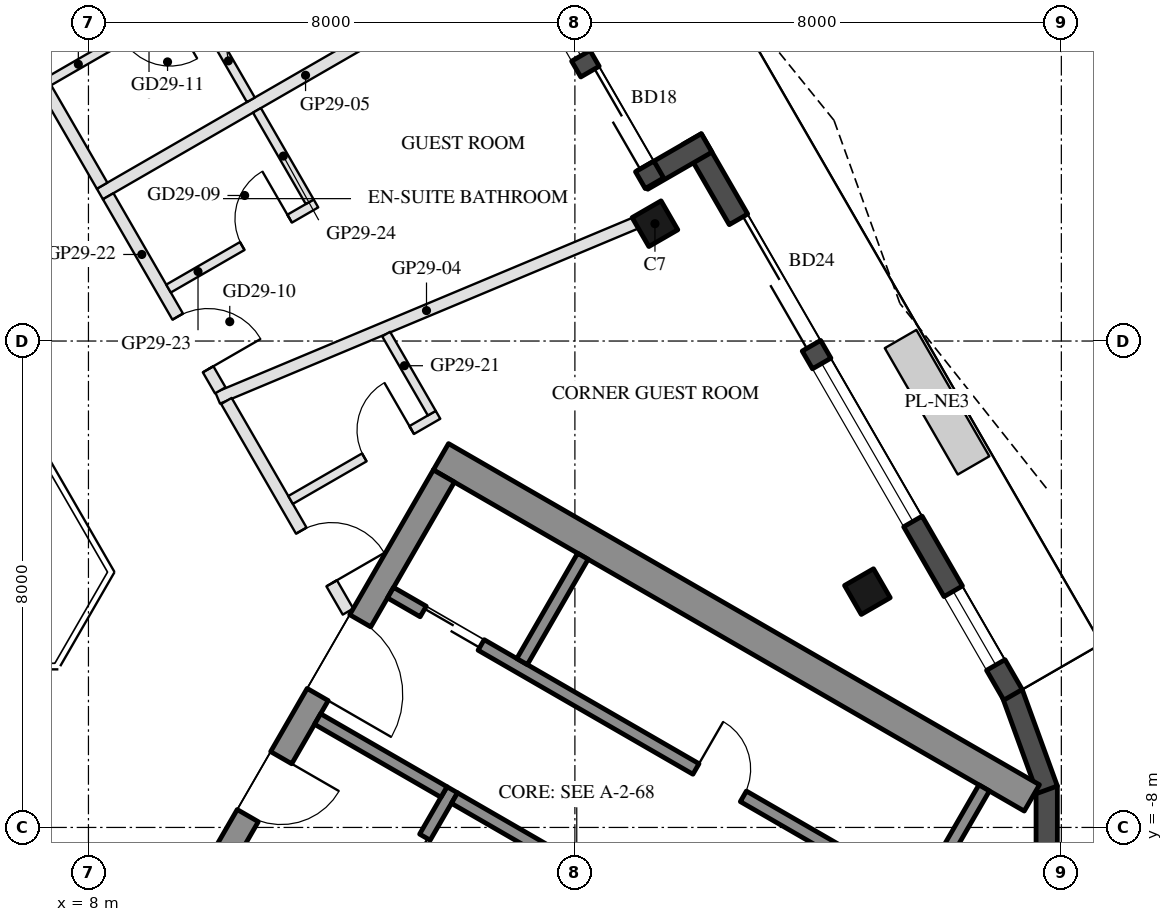
"""IFC4 building model, lengths in metres.
Left out: names, types, materials, properties, quantities, classifications, styles, units other than length and angle.
Written with IfcOpenShell. Run it as: python <this file> out.ifc"""

import sys

from ifc_helpers import new_model, si_unit, direction, frame, frame_2d, origin, origin_2d, place, context, subcontext, project, spatial, rectangle, hollow_rectangle, extrude, boolean, halfspace, element, fill, save


model = new_model("IFC4")
c1 = context("Model", 3, precision=1e-05, world=origin(), true_north=direction((0.0, 1.0)))
c2 = subcontext(c1, "Body", "Model", "MODEL_VIEW")
j1 = project(units=[si_unit("LENGTHUNIT", "METRE"), si_unit("PLANEANGLEUNIT", "RADIAN")], contexts=[c1])
p1 = place(None, origin())
s1 = spatial("IfcSite", under=j1, at=p1, CompositionType="ELEMENT")
p2 = place(p1, origin())
s2 = spatial("IfcBuilding", under=s1, at=p2, CompositionType="ELEMENT")
p3 = place(p2, frame((0.0, 0.0, 294.8)))
s3 = spatial("IfcBuildingStorey", under=s2, at=p3, CompositionType="ELEMENT", Elevation=294.8)
p4 = place(p3, frame((20.81, -4.121, 0.0), z_axis=(0.0, 0.0, 1.0), x_axis=(-0.5, 0.866025403784, 0.0)))
e1 = element("IfcColumn", 1, at=p4, inside=s3, PredefinedType="COLUMN", context=c2, shape_type="SweptSolid", body=[
    boolean("DIFFERENCE", extrude(hollow_rectangle(XDim=0.55, YDim=0.55, WallThickness=0.025, at=origin_2d()), origin(), (0.0, 0.0, 1.0), 3.7), halfspace(frame((0.0, 0.0, 3.66), z_axis=(0.0, 0.0, 1.0), x_axis=(1.0, 0.0, 0.0)), False)),
])
p5 = place(p3, frame((17.317, 1.93, 0.0), z_axis=(0.0, 0.0, 1.0), x_axis=(-0.5, 0.866025403784, 0.0)))
e2 = element("IfcColumn", 2, at=p5, inside=s3, PredefinedType="COLUMN", context=c2, shape_type="SweptSolid", body=[
    boolean("DIFFERENCE", extrude(hollow_rectangle(XDim=0.55, YDim=0.55, WallThickness=0.025, at=origin_2d()), origin(), (0.0, 0.0, 1.0), 3.7), halfspace(frame((0.0, 0.0, 3.666), z_axis=(0.0, 0.0, 1.0), x_axis=(1.0, 0.0, 0.0)), False)),
])
for number, where, z_axis, x_axis in (
    (3, (23.759, -9.008, 0.0), (0.0, 0.0, 1.0), (0.0, 1.0, 0.0)),
    (4, (23.77, -7.379, 0.0), (0.0, 0.0, 1.0), (-0.342, 0.94, 0.0)),
):
    element("IfcWall", number, at=place(p3, frame(where, z_axis=z_axis, x_axis=x_axis)), inside=s3, PredefinedType="SOLIDWALL", context=c2, shape_type="SweptSolid", body=[
        extrude(rectangle(XDim=1.689, YDim=0.35, at=frame_2d((0.845, 0.0))), origin(), (0.0, 0.0, 1.0), 3.55),
    ])
p6 = place(p3, frame((23.205, -5.819, 0.0), z_axis=(0.0, 0.0, 1.0), x_axis=(-0.500010118922, 0.866019561543, 0.0)))
e5 = element("IfcWall", 5, at=p6, inside=s3, PredefinedType="SOLIDWALL", context=c2, shape_type="SweptSolid", body=[
    extrude(rectangle(XDim=10.554, YDim=0.35, at=frame_2d((5.277, 0.0))), origin(), (0.0, 0.0, 1.0), 3.55),
])
p7 = place(p6, frame((0.566, 0.0, 0.3)))
e6 = element("IfcOpeningElement", 6, at=p7, cuts=e5, PredefinedType="OPENING", context=c2, shape_type="SweptSolid", body=[
    extrude(rectangle(XDim=1.4, YDim=2.65, at=frame_2d((0.7, 1.325))), frame((0.0, 0.185, 0.0), z_axis=(0.0, -1.0, 0.0), x_axis=(1.0, 0.0, 0.0)), (0.0, 0.0, 1.0), 0.37),
])
p8 = place(p6, frame((6.63, 0.0, 0.0)))
e7 = element("IfcOpeningElement", 7, at=p8, cuts=e5, PredefinedType="OPENING", context=c2, shape_type="SweptSolid", body=[
    extrude(rectangle(XDim=2.4, YDim=2.4, at=frame_2d((1.2, 1.2))), frame((0.0, 0.185, 0.0), z_axis=(0.0, -1.0, 0.0), x_axis=(1.0, 0.0, 0.0)), (0.0, 0.0, 1.0), 0.37),
])
p9 = place(p6, frame((3.292, 0.0, 0.3)))
e8 = element("IfcOpeningElement", 8, at=p9, cuts=e5, PredefinedType="OPENING", context=c2, shape_type="SweptSolid", body=[
    extrude(rectangle(XDim=3.0, YDim=2.65, at=frame_2d((1.5, 1.325))), frame((0.0, 0.185, 0.0), z_axis=(0.0, -1.0, 0.0), x_axis=(1.0, 0.0, 0.0)), (0.0, 0.0, 1.0), 0.37),
])
p10 = place(p3, frame((18.167, 3.258, 0.0), z_axis=(0.0, 0.0, 1.0), x_axis=(-0.866005645448, -0.500034220881, 0.0)))
e9 = element("IfcWall", 9, at=p10, inside=s3, PredefinedType="SOLIDWALL", context=c2, shape_type="SweptSolid", body=[
    extrude(rectangle(XDim=1.22, YDim=0.35, at=frame_2d((0.61, 0.0))), origin(), (0.0, 0.0, 1.0), 3.55),
])
p11 = place(p3, frame((17.308, 2.595, 0.0), z_axis=(0.0, 0.0, 1.0), x_axis=(-0.500005339912, 0.866022320763, 0.0)))
e10 = element("IfcWall", 10, at=p11, inside=s3, PredefinedType="SOLIDWALL", context=c2, shape_type="SweptSolid", body=[
    extrude(rectangle(XDim=5.827, YDim=0.35, at=frame_2d((2.914, 0.0))), origin(), (0.0, 0.0, 1.0), 3.55),
])
p12 = place(p11, frame((0.32, 0.0, 0.0)))
e11 = element("IfcOpeningElement", 11, at=p12, cuts=e10, PredefinedType="OPENING", context=c2, shape_type="SweptSolid", body=[
    extrude(rectangle(XDim=1.8, YDim=2.4, at=frame_2d((0.9, 1.2))), frame((0.0, 0.185, 0.0), z_axis=(0.0, -1.0, 0.0), x_axis=(1.0, 0.0, 0.0)), (0.0, 0.0, 1.0), 0.37),
])
p13 = place(p11, frame((2.42, 0.0, 0.3)))
e12 = element("IfcOpeningElement", 12, at=p13, cuts=e10, PredefinedType="OPENING", context=c2, shape_type="SweptSolid", body=[
    extrude(rectangle(XDim=1.5, YDim=2.65, at=frame_2d((0.75, 1.325))), frame((0.0, 0.185, 0.0), z_axis=(0.0, -1.0, 0.0), x_axis=(1.0, 0.0, 0.0)), (0.0, 0.0, 1.0), 0.37),
])
p14 = place(p3, frame((13.797, -1.903, 0.0), z_axis=(0.0, 0.0, 1.0), x_axis=(0.866025449148, -0.499999921427, 0.0)))
e13 = element("IfcWall", 13, at=p14, inside=s3, PredefinedType="SHEAR", context=c2, shape_type="SweptSolid", body=[
    extrude(rectangle(XDim=11.222, YDim=0.5, at=frame_2d((5.611, 0.0))), origin(), (0.0, 0.0, 1.0), 3.5),
])
p15 = place(p3, frame((8.845, -10.88, 0.0), z_axis=(0.0, 0.0, 1.0), x_axis=(0.500004234368, 0.866022959057, 0.0)))
e14 = element("IfcWall", 14, at=p15, inside=s3, PredefinedType="SHEAR", context=c2, shape_type="SweptSolid", body=[
    extrude(rectangle(XDim=10.0, YDim=0.4, at=frame_2d((5.0, 0.0))), origin(), (0.0, 0.0, 1.0), 3.5),
])
p16 = place(p15, frame((3.55, 0.0, 0.0)))
e15 = element("IfcOpeningElement", 15, at=p16, cuts=e14, PredefinedType="OPENING", context=c2, shape_type="SweptSolid", body=[
    extrude(rectangle(XDim=1.1, YDim=2.1, at=frame_2d((0.55, 1.05))), frame((0.0, 0.21, 0.0), z_axis=(0.0, -1.0, 0.0), x_axis=(1.0, 0.0, 0.0)), (0.0, 0.0, 1.0), 0.42),
])
p17 = place(p15, frame((5.85, 0.0, 0.0)))
e16 = element("IfcOpeningElement", 16, at=p17, cuts=e14, PredefinedType="OPENING", context=c2, shape_type="SweptSolid", body=[
    extrude(rectangle(XDim=1.4, YDim=2.1, at=frame_2d((0.7, 1.05))), frame((0.0, 0.21, 0.0), z_axis=(0.0, -1.0, 0.0), x_axis=(1.0, 0.0, 0.0)), (0.0, 0.0, 1.0), 0.42),
])
p18 = place(p3, frame((12.583, -9.805, 0.0), z_axis=(0.0, 0.0, 1.0), x_axis=(0.49994636267, 0.866056369097, 0.0)))
e17 = element("IfcWall", 17, at=p18, inside=s3, PredefinedType="SHEAR", context=c2, shape_type="SweptSolid", body=[
    extrude(rectangle(XDim=2.8, YDim=0.2, at=frame_2d((1.4, 0.0))), origin(), (0.0, 0.0, 1.0), 3.5),
])
p19 = place(p18, frame((0.7, 0.0, 0.0)))
e18 = element("IfcOpeningElement", 18, at=p19, cuts=e17, PredefinedType="OPENING", context=c2, shape_type="SweptSolid", body=[
    extrude(rectangle(XDim=1.2, YDim=2.1, at=frame_2d((0.6, 1.05))), frame((0.0, 0.11, 0.0), z_axis=(0.0, -1.0, 0.0), x_axis=(1.0, 0.0, 0.0)), (0.0, 0.0, 1.0), 0.22),
])
p20 = place(p3, frame((11.768, -6.217, 0.0), z_axis=(0.0, 0.0, 1.0), x_axis=(0.866050077142, -0.499957262057, 0.0)))
e19 = element("IfcWall", 19, at=p20, inside=s3, PredefinedType="SHEAR", context=c2, shape_type="SweptSolid", body=[
    extrude(rectangle(XDim=2.4, YDim=0.2, at=frame_2d((1.2, 0.0))), origin(), (0.0, 0.0, 1.0), 3.5),
])
p21 = place(p3, frame((14.02, -7.517, 0.0), z_axis=(0.0, 0.0, 1.0), x_axis=(0.866034573852, -0.49998411664, 0.0)))
e20 = element("IfcWall", 20, at=p21, inside=s3, PredefinedType="SHEAR", context=c2, shape_type="SweptSolid", body=[
    extrude(rectangle(XDim=2.8, YDim=0.2, at=frame_2d((1.4, 0.0))), origin(), (0.0, 0.0, 1.0), 3.5),
])
p22 = place(p3, frame((12.968, -4.138, 0.0), z_axis=(0.0, 0.0, 1.0), x_axis=(0.866028328073, -0.49999493495, 0.0)))
e21 = element("IfcWall", 21, at=p22, inside=s3, PredefinedType="SHEAR", context=c2, shape_type="SweptSolid", body=[
    extrude(rectangle(XDim=10.16, YDim=0.2, at=frame_2d((5.08, 0.0))), origin(), (0.0, 0.0, 1.0), 3.5),
])
p23 = place(p22, frame((0.62, 0.0, 0.0)))
e22 = element("IfcOpeningElement", 22, at=p23, cuts=e21, PredefinedType="OPENING", context=c2, shape_type="SweptSolid", body=[
    extrude(rectangle(XDim=1.1, YDim=2.1, at=frame_2d((0.55, 1.05))), frame((0.0, 0.11, 0.0), z_axis=(0.0, -1.0, 0.0), x_axis=(1.0, 0.0, 0.0)), (0.0, 0.0, 1.0), 0.22),
])
p24 = place(p22, frame((5.8, 0.0, 0.0)))
e23 = element("IfcOpeningElement", 23, at=p24, cuts=e21, PredefinedType="OPENING", context=c2, shape_type="SweptSolid", body=[
    extrude(rectangle(XDim=0.9, YDim=2.1, at=frame_2d((0.45, 1.05))), frame((0.0, 0.11, 0.0), z_axis=(0.0, -1.0, 0.0), x_axis=(1.0, 0.0, 0.0)), (0.0, 0.0, 1.0), 0.22),
])
for number, where, z_axis, x_axis in (
    (24, (15.131, -5.272, 0.0), (0.0, 0.0, 1.0), (0.5, 0.866, 0.0)),
    (25, (21.73, -9.082, 0.0), (0.0, 0.0, 1.0), (0.5, 0.866, 0.0)),
):
    element("IfcWall", number, at=place(p3, frame(where, z_axis=z_axis, x_axis=x_axis)), inside=s3, PredefinedType="SHEAR", context=c2, shape_type="SweptSolid", body=[
        extrude(rectangle(XDim=2.0, YDim=0.2, at=frame_2d((1.0, 0.0))), origin(), (0.0, 0.0, 1.0), 3.5),
    ])
p25 = place(p3, frame((16.994, 1.939, 0.0), z_axis=(0.0, 0.0, 1.0), x_axis=(-0.922394541425, -0.386249025824, 0.0)))
e26 = element("IfcWall", 26, at=p25, inside=s3, PredefinedType="PARTITIONING", context=c2, shape_type="SweptSolid", body=[
    extrude(rectangle(XDim=7.447, YDim=0.2, at=frame_2d((3.723, 0.0))), origin(), (0.0, 0.0, 1.0), 3.05),
])
p26 = place(p3, frame((14.953, 6.324, 0.0), z_axis=(0.0, 0.0, 1.0), x_axis=(-0.866030491634, -0.499991187483, 0.0)))
e27 = element("IfcWall", 27, at=p26, inside=s3, PredefinedType="PARTITIONING", context=c2, shape_type="SweptSolid", body=[
    extrude(rectangle(XDim=7.812, YDim=0.2, at=frame_2d((3.906, 0.0))), origin(), (0.0, 0.0, 1.0), 3.1),
])
p27 = place(p3, frame((10.269, -0.986, 0.0), z_axis=(0.0, 0.0, 1.0), x_axis=(0.50004472278, -0.865999581536, 0.0)))
e28 = element("IfcWall", 28, at=p27, inside=s3, PredefinedType="PARTITIONING", context=c2, shape_type="SweptSolid", body=[
    extrude(rectangle(XDim=4.0, YDim=0.2, at=frame_2d((2.0, 0.0))), origin(), (0.0, 0.0, 1.0), 3.05),
])
p28 = place(p27, frame((2.463, 0.0, 0.0)))
e29 = element("IfcOpeningElement", 29, at=p28, cuts=e28, PredefinedType="OPENING", context=c2, shape_type="SweptSolid", body=[
    extrude(rectangle(XDim=1.0, YDim=2.1, at=frame_2d((0.5, 1.05))), frame((0.0, 0.11, 0.0), z_axis=(0.0, -1.0, 0.0), x_axis=(1.0, 0.0, 0.0)), (0.0, 0.0, 1.0), 0.22),
])
p29 = place(p3, frame((11.324, -2.614, 0.0), z_axis=(0.0, 0.0, 1.0), x_axis=(0.866034573852, 0.49998411664, 0.0)))
e30 = element("IfcWall", 30, at=p29, inside=s3, PredefinedType="PARTITIONING", context=c2, shape_type="SweptSolid", body=[
    extrude(rectangle(XDim=2.8, YDim=0.15, at=frame_2d((1.4, 0.0))), origin(), (0.0, 0.0, 1.0), 3.55),
])
p30 = place(p29, frame((1.4, 0.0, 0.0)))
e31 = element("IfcOpeningElement", 31, at=p30, cuts=e30, PredefinedType="OPENING", context=c2, shape_type="SweptSolid", body=[
    extrude(rectangle(XDim=0.9, YDim=2.1, at=frame_2d((0.45, 1.05))), frame((0.0, 0.085, 0.0), z_axis=(0.0, -1.0, 0.0), x_axis=(1.0, 0.0, 0.0)), (0.0, 0.0, 1.0), 0.17),
])
p31 = place(p3, frame((13.646, -1.187, 0.0), z_axis=(0.0, 0.0, 1.0), x_axis=(-0.499985098601, 0.86603400694, 0.0)))
e32 = element("IfcWall", 32, at=p31, inside=s3, PredefinedType="PARTITIONING", context=c2, shape_type="SweptSolid", body=[
    extrude(rectangle(XDim=1.502, YDim=0.15, at=frame_2d((0.751, 0.0))), origin(), (0.0, 0.0, 1.0), 3.05),
])
p32 = place(p3, frame((8.325, 2.381, 0.0), z_axis=(0.0, 0.0, 1.0), x_axis=(0.499949858301, -0.866054351173, 0.0)))
e33 = element("IfcWall", 33, at=p32, inside=s3, PredefinedType="PARTITIONING", context=c2, shape_type="SweptSolid", body=[
    extrude(rectangle(XDim=3.687, YDim=0.2, at=frame_2d((1.843, 0.0))), origin(), (0.0, 0.0, 1.0), 3.05),
])
p33 = place(p32, frame((2.286, 0.0, 0.0)))
e34 = element("IfcOpeningElement", 34, at=p33, cuts=e33, PredefinedType="OPENING", context=c2, shape_type="SweptSolid", body=[
    extrude(rectangle(XDim=1.0, YDim=2.1, at=frame_2d((0.5, 1.05))), frame((0.0, 0.11, 0.0), z_axis=(0.0, -1.0, 0.0), x_axis=(1.0, 0.0, 0.0)), (0.0, 0.0, 1.0), 0.22),
])
p34 = place(p3, frame((9.317, 0.863, 0.0), z_axis=(0.0, 0.0, 1.0), x_axis=(0.865996816683, 0.500049511043, 0.0)))
e35 = element("IfcWall", 35, at=p34, inside=s3, PredefinedType="PARTITIONING", context=c2, shape_type="SweptSolid", body=[
    extrude(rectangle(XDim=2.8, YDim=0.15, at=frame_2d((1.4, 0.0))), origin(), (0.0, 0.0, 1.0), 3.55),
])
p35 = place(p34, frame((1.4, 0.0, 0.0)))
e36 = element("IfcOpeningElement", 36, at=p35, cuts=e35, PredefinedType="OPENING", context=c2, shape_type="SweptSolid", body=[
    extrude(rectangle(XDim=0.9, YDim=2.1, at=frame_2d((0.45, 1.05))), frame((0.0, 0.085, 0.0), z_axis=(0.0, -1.0, 0.0), x_axis=(1.0, 0.0, 0.0)), (0.0, 0.0, 1.0), 0.17),
])
p36 = place(p3, frame((11.639, 2.29, 0.0), z_axis=(0.0, 0.0, 1.0), x_axis=(-0.500115958453, 0.865958444789, 0.0)))
e37 = element("IfcWall", 37, at=p36, inside=s3, PredefinedType="PARTITIONING", context=c2, shape_type="SweptSolid", body=[
    extrude(rectangle(XDim=1.736, YDim=0.15, at=frame_2d((0.868, 0.0))), origin(), (0.0, 0.0, 1.0), 3.05),
])
p37 = place(p3, frame((2.281, 12.85, 0.0), z_axis=(0.0, 0.0, 1.0), x_axis=(0.500002143212, -0.866024166397, 0.0)))
e38 = element("IfcWall", 38, at=p37, inside=s3, PredefinedType="PARTITIONING", context=c2, shape_type="SweptSolid", body=[
    extrude(rectangle(XDim=11.888, YDim=0.2, at=frame_2d((5.944, 0.0))), origin(), (0.0, 0.0, 1.0), 3.05),
])
p38 = place(p37, frame((8.438, 0.0, 0.0)))
e39 = element("IfcOpeningElement", 39, at=p38, cuts=e38, PredefinedType="OPENING", context=c2, shape_type="SweptSolid", body=[
    extrude(rectangle(XDim=1.0, YDim=2.1, at=frame_2d((0.5, 1.05))), frame((0.0, 0.11, 0.0), z_axis=(0.0, -1.0, 0.0), x_axis=(1.0, 0.0, 0.0)), (0.0, 0.0, 1.0), 0.22),
])
p39 = place(p3, frame((9.774, 5.672, 0.0), z_axis=(0.0, 0.0, 1.0), x_axis=(-0.866056369097, -0.49994636267, 0.0)))
e40 = element("IfcWall", 40, at=p39, inside=s3, PredefinedType="PARTITIONING", context=c2, shape_type="SweptSolid", body=[
    extrude(rectangle(XDim=2.8, YDim=0.15, at=frame_2d((1.4, 0.0))), origin(), (0.0, 0.0, 1.0), 3.05),
])
p40 = place(p39, frame((0.5, 0.0, 0.0)))
e41 = element("IfcOpeningElement", 41, at=p40, cuts=e40, PredefinedType="OPENING", context=c2, shape_type="SweptSolid", body=[
    extrude(rectangle(XDim=0.9, YDim=2.1, at=frame_2d((0.45, 1.05))), frame((0.0, 0.085, 0.0), z_axis=(0.0, -1.0, 0.0), x_axis=(1.0, 0.0, 0.0)), (0.0, 0.0, 1.0), 0.17),
])
p41 = place(p3, frame((10.671, 3.967, 0.0), z_axis=(0.0, 0.0, 1.0), x_axis=(-0.500042316284, 0.866000971088, 0.0)))
e42 = element("IfcWall", 42, at=p41, inside=s3, PredefinedType="PARTITIONING", context=c2, shape_type="SweptSolid", body=[
    extrude(rectangle(XDim=1.85, YDim=0.15, at=frame_2d((0.925, 0.0))), origin(), (0.0, 0.0, 1.0), 3.05),
])
p42 = place(p7, origin())
e43 = element("IfcWindow", 43, at=p42, inside=s3, PartitioningType="SINGLE_PANEL", PredefinedType="WINDOW", context=c2, shape_type="SweptSolid", body=[
    extrude(rectangle(XDim=1.4, YDim=2.65, at=frame_2d((0.7, 1.325))), frame((0.0, 0.03, 0.0), z_axis=(0.0, -1.0, 0.0), x_axis=(1.0, 0.0, 0.0)), (0.0, 0.0, 1.0), 0.06),
])
fill(e6, e43)
p43 = place(p8, frame((2.4, 0.0, 0.0), z_axis=(0.0, 0.0, 1.0), x_axis=(-1.0, 0.0, 0.0)))
e44 = element("IfcDoor", 44, at=p43, inside=s3, OperationType="SLIDING_TO_LEFT", PredefinedType="DOOR", context=c2, shape_type="SweptSolid", body=[
    extrude(rectangle(XDim=2.4, YDim=2.4, at=frame_2d((1.2, 1.2))), frame((0.0, 0.025, 0.0), z_axis=(0.0, -1.0, 0.0), x_axis=(1.0, 0.0, 0.0)), (0.0, 0.0, 1.0), 0.05),
])
fill(e7, e44)
p44 = place(p9, origin())
e45 = element("IfcWindow", 45, at=p44, inside=s3, PartitioningType="SINGLE_PANEL", PredefinedType="WINDOW", context=c2, shape_type="SweptSolid", body=[
    extrude(rectangle(XDim=3.0, YDim=2.65, at=frame_2d((1.5, 1.325))), frame((0.0, 0.03, 0.0), z_axis=(0.0, -1.0, 0.0), x_axis=(1.0, 0.0, 0.0)), (0.0, 0.0, 1.0), 0.06),
])
fill(e8, e45)
p45 = place(p12, frame((1.8, 0.0, 0.0), z_axis=(0.0, 0.0, 1.0), x_axis=(-1.0, 0.0, 0.0)))
e46 = element("IfcDoor", 46, at=p45, inside=s3, OperationType="SLIDING_TO_LEFT", PredefinedType="DOOR", context=c2, shape_type="SweptSolid", body=[
    extrude(rectangle(XDim=1.8, YDim=2.4, at=frame_2d((0.9, 1.2))), frame((0.0, 0.025, 0.0), z_axis=(0.0, -1.0, 0.0), x_axis=(1.0, 0.0, 0.0)), (0.0, 0.0, 1.0), 0.05),
])
fill(e11, e46)
p46 = place(p13, origin())
e47 = element("IfcWindow", 47, at=p46, inside=s3, PartitioningType="SINGLE_PANEL", PredefinedType="WINDOW", context=c2, shape_type="SweptSolid", body=[
    extrude(rectangle(XDim=1.5, YDim=2.65, at=frame_2d((0.75, 1.325))), frame((0.0, 0.03, 0.0), z_axis=(0.0, -1.0, 0.0), x_axis=(1.0, 0.0, 0.0)), (0.0, 0.0, 1.0), 0.06),
])
fill(e12, e47)
p47 = place(p19, origin())
e48 = element("IfcDoor", 48, at=p47, inside=s3, OperationType="DOUBLE_DOOR_SLIDING", PredefinedType="DOOR", context=c2, shape_type="SweptSolid", body=[
    extrude(rectangle(XDim=1.2, YDim=2.1, at=frame_2d((0.6, 1.05))), frame((0.0, 0.025, 0.0), z_axis=(0.0, -1.0, 0.0), x_axis=(1.0, 0.0, 0.0)), (0.0, 0.0, 1.0), 0.05),
])
fill(e18, e48)
p48 = place(p23, origin())
e49 = element("IfcDoor", 49, at=p48, inside=s3, OperationType="DOUBLE_DOOR_SLIDING", PredefinedType="DOOR", context=c2, shape_type="SweptSolid", body=[
    extrude(rectangle(XDim=1.1, YDim=2.1, at=frame_2d((0.55, 1.05))), frame((0.0, 0.025, 0.0), z_axis=(0.0, -1.0, 0.0), x_axis=(1.0, 0.0, 0.0)), (0.0, 0.0, 1.0), 0.05),
])
fill(e22, e49)
p49 = place(p24, origin())
e50 = element("IfcDoor", 50, at=p49, inside=s3, OperationType="SINGLE_SWING_LEFT", PredefinedType="DOOR", context=c2, shape_type="SweptSolid", body=[
    extrude(rectangle(XDim=0.9, YDim=2.1, at=frame_2d((0.45, 1.05))), frame((0.0, 0.025, 0.0), z_axis=(0.0, -1.0, 0.0), x_axis=(1.0, 0.0, 0.0)), (0.0, 0.0, 1.0), 0.05),
])
fill(e23, e50)
p50 = place(p16, frame((1.1, 0.0, 0.0), z_axis=(0.0, 0.0, 1.0), x_axis=(-1.0, 0.0, 0.0)))
e51 = element("IfcDoor", 51, at=p50, inside=s3, OperationType="SINGLE_SWING_LEFT", PredefinedType="DOOR", context=c2, shape_type="SweptSolid", body=[
    extrude(rectangle(XDim=1.1, YDim=2.1, at=frame_2d((0.55, 1.05))), frame((0.0, 0.025, 0.0), z_axis=(0.0, -1.0, 0.0), x_axis=(1.0, 0.0, 0.0)), (0.0, 0.0, 1.0), 0.05),
])
fill(e15, e51)
p51 = place(p17, frame((1.4, 0.0, 0.0), z_axis=(0.0, 0.0, 1.0), x_axis=(-1.0, 0.0, 0.0)))
e52 = element("IfcDoor", 52, at=p51, inside=s3, OperationType="DOUBLE_DOOR_SINGLE_SWING", PredefinedType="DOOR", context=c2, shape_type="SweptSolid", body=[
    extrude(rectangle(XDim=1.4, YDim=2.1, at=frame_2d((0.7, 1.05))), frame((0.0, 0.025, 0.0), z_axis=(0.0, -1.0, 0.0), x_axis=(1.0, 0.0, 0.0)), (0.0, 0.0, 1.0), 0.05),
])
fill(e16, e52)
p52 = place(p30, origin())
e53 = element("IfcDoor", 53, at=p52, inside=s3, OperationType="SINGLE_SWING_RIGHT", PredefinedType="DOOR", context=c2, shape_type="SweptSolid", body=[
    extrude(rectangle(XDim=0.9, YDim=2.1, at=frame_2d((0.45, 1.05))), frame((0.0, 0.025, 0.0), z_axis=(0.0, -1.0, 0.0), x_axis=(1.0, 0.0, 0.0)), (0.0, 0.0, 1.0), 0.05),
])
fill(e31, e53)
p53 = place(p28, origin())
e54 = element("IfcDoor", 54, at=p53, inside=s3, OperationType="SINGLE_SWING_RIGHT", PredefinedType="DOOR", context=c2, shape_type="SweptSolid", body=[
    extrude(rectangle(XDim=1.0, YDim=2.1, at=frame_2d((0.5, 1.05))), frame((0.0, 0.025, 0.0), z_axis=(0.0, -1.0, 0.0), x_axis=(1.0, 0.0, 0.0)), (0.0, 0.0, 1.0), 0.05),
])
fill(e29, e54)
p54 = place(p35, origin())
e55 = element("IfcDoor", 55, at=p54, inside=s3, OperationType="SINGLE_SWING_RIGHT", PredefinedType="DOOR", context=c2, shape_type="SweptSolid", body=[
    extrude(rectangle(XDim=0.9, YDim=2.1, at=frame_2d((0.45, 1.05))), frame((0.0, 0.025, 0.0), z_axis=(0.0, -1.0, 0.0), x_axis=(1.0, 0.0, 0.0)), (0.0, 0.0, 1.0), 0.05),
])
fill(e36, e55)
p55 = place(p33, origin())
e56 = element("IfcDoor", 56, at=p55, inside=s3, OperationType="SINGLE_SWING_RIGHT", PredefinedType="DOOR", context=c2, shape_type="SweptSolid", body=[
    extrude(rectangle(XDim=1.0, YDim=2.1, at=frame_2d((0.5, 1.05))), frame((0.0, 0.025, 0.0), z_axis=(0.0, -1.0, 0.0), x_axis=(1.0, 0.0, 0.0)), (0.0, 0.0, 1.0), 0.05),
])
fill(e34, e56)
save(model, sys.argv[1])
